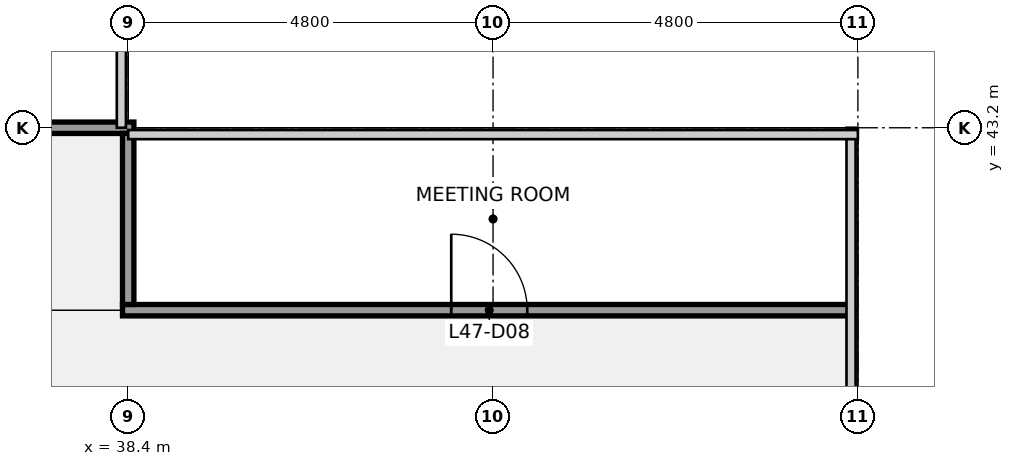
"""IFC4 building model, lengths in metres.
Left out: names, types, materials, properties, quantities, classifications, styles, units other than length and angle.
Written with IfcOpenShell. Run it as: python <this file> out.ifc"""

import sys

from ifc_helpers import new_model, si_unit, direction, frame, frame_2d, origin, place, context, subcontext, project, spatial, rectangle, extrude, element, fill, save


model = new_model("IFC4")
c1 = context("Model", 3, precision=1e-05, world=origin(), true_north=direction((0.0, 1.0)))
c2 = subcontext(c1, "Body", "Model", "MODEL_VIEW")
j1 = project(units=[si_unit("LENGTHUNIT", "METRE"), si_unit("PLANEANGLEUNIT", "RADIAN")], contexts=[c1])
p1 = place(None, origin())
s1 = spatial("IfcSite", under=j1, at=p1, CompositionType="ELEMENT")
p2 = place(p1, origin())
s2 = spatial("IfcBuilding", under=s1, at=p2, CompositionType="ELEMENT")
p3 = place(p2, frame((0.0, 0.0, 217.2)))
s3 = spatial("IfcBuildingStorey", under=s2, at=p3, CompositionType="ELEMENT", Elevation=217.2)
p4 = place(p3, frame((38.325, 40.8, 0.0), z_axis=(0.0, 0.0, 1.0), x_axis=(1.0, 0.0, 0.0)))
e1 = element("IfcWall", 1, at=p4, inside=s3, PredefinedType="PARTITIONING", context=c2, shape_type="SweptSolid", body=[
    extrude(rectangle(XDim=9.575, YDim=0.15, at=frame_2d((4.788, 0.0))), origin(), (0.0, 0.0, 1.0), 2.849),
])
p5 = place(p4, frame((4.325, 0.0, 0.0)))
e2 = element("IfcOpeningElement", 2, at=p5, cuts=e1, PredefinedType="OPENING", context=c2, shape_type="SweptSolid", body=[
    extrude(rectangle(XDim=1.0, YDim=2.1, at=frame_2d((0.5, 1.05))), frame((0.0, 0.085, 0.0), z_axis=(0.0, -1.0, 0.0), x_axis=(1.0, 0.0, 0.0)), (0.0, 0.0, 1.0), 0.17),
])
p6 = place(p3, frame((19.125, 43.2, 0.0), z_axis=(0.0, 0.0, 1.0), x_axis=(1.0, 0.0, 0.0)))
e3 = element("IfcWall", 3, at=p6, inside=s3, PredefinedType="PARTITIONING", context=c2, shape_type="SweptSolid", body=[
    extrude(rectangle(XDim=19.35, YDim=0.15, at=frame_2d((9.675, 0.0))), origin(), (0.0, 0.0, 1.0), 2.849),
])
p7 = place(p6, frame((4.375, 0.0, 0.0)))
e4 = element("IfcOpeningElement", 4, at=p7, cuts=e3, PredefinedType="OPENING", context=c2, shape_type="SweptSolid", body=[
    extrude(rectangle(XDim=1.0, YDim=2.1, at=frame_2d((0.5, 1.05))), frame((0.0, 0.085, 0.0), z_axis=(0.0, -1.0, 0.0), x_axis=(1.0, 0.0, 0.0)), (0.0, 0.0, 1.0), 0.17),
])
p8 = place(p6, frame((13.975, 0.0, 0.0)))
e5 = element("IfcOpeningElement", 5, at=p8, cuts=e3, PredefinedType="OPENING", context=c2, shape_type="SweptSolid", body=[
    extrude(rectangle(XDim=1.0, YDim=2.1, at=frame_2d((0.5, 1.05))), frame((0.0, 0.085, 0.0), z_axis=(0.0, -1.0, 0.0), x_axis=(1.0, 0.0, 0.0)), (0.0, 0.0, 1.0), 0.17),
])
p9 = place(p3, frame((38.4, 40.875, 0.0), z_axis=(0.0, 0.0, 1.0), x_axis=(0.0, 1.0, 0.0)))
e6 = element("IfcWall", 6, at=p9, inside=s3, PredefinedType="PARTITIONING", context=c2, shape_type="SweptSolid", body=[
    extrude(rectangle(XDim=2.25, YDim=0.15, at=frame_2d((1.125, 0.0))), origin(), (0.0, 0.0, 1.0), 2.849),
])
p10 = place(p5, origin())
e7 = element("IfcDoor", 7, at=p10, inside=s3, OperationType="SINGLE_SWING_LEFT", PredefinedType="DOOR", context=c2, shape_type="SweptSolid", body=[
    extrude(rectangle(XDim=1.0, YDim=2.1, at=frame_2d((0.5, 1.05))), frame((0.0, 0.025, 0.0), z_axis=(0.0, -1.0, 0.0), x_axis=(1.0, 0.0, 0.0)), (0.0, 0.0, 1.0), 0.05),
])
fill(e2, e7)
save(model, sys.argv[1])
